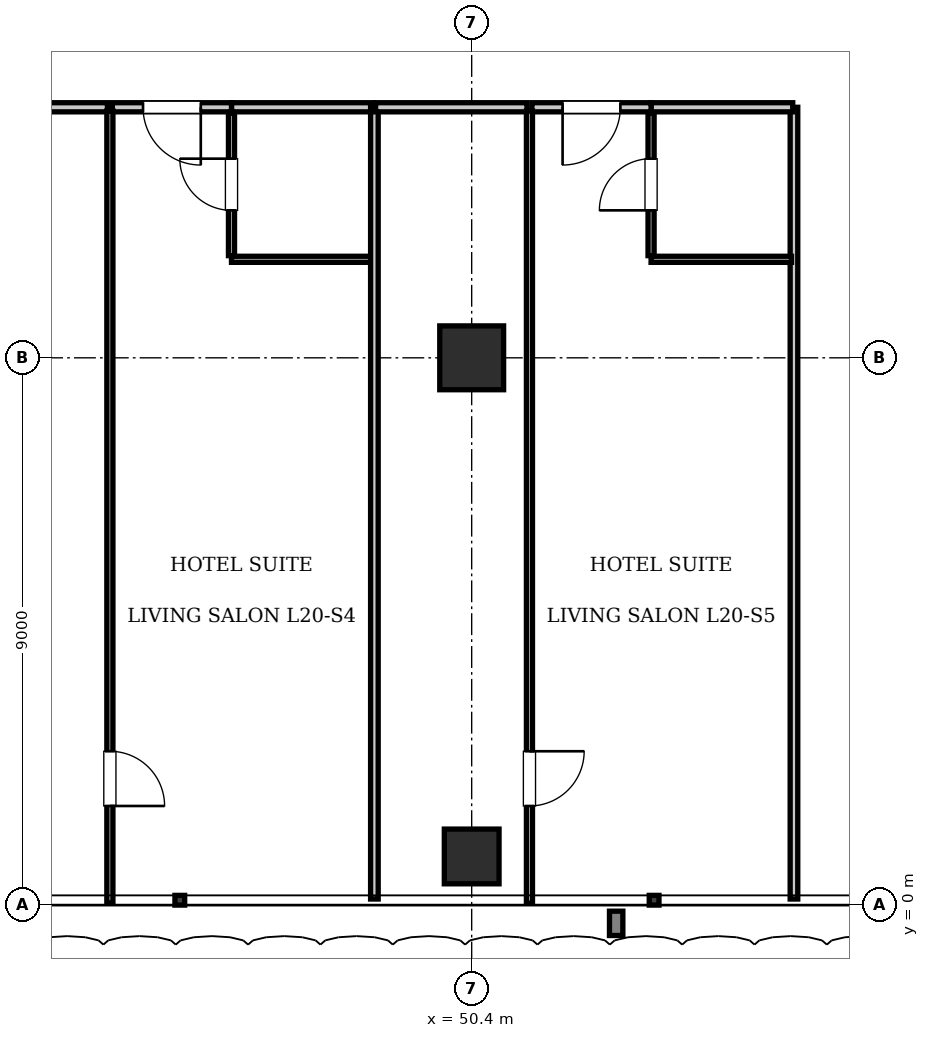
"""IFC4 building model, lengths in metres.
Left out: names, types, materials, properties, quantities, classifications, styles, units other than length and angle.
Written with IfcOpenShell. Run it as: python <this file> out.ifc"""

import sys

from ifc_helpers import new_model, si_unit, direction, frame, frame_2d, origin, origin_2d, place, context, subcontext, project, spatial, rectangle, extrude, element, fill, save


model = new_model("IFC4")
c1 = context("Model", 3, precision=1e-05, world=origin(), true_north=direction((0.0, 1.0)))
c2 = subcontext(c1, "Body", "Model", "MODEL_VIEW")
j1 = project(units=[si_unit("LENGTHUNIT", "METRE"), si_unit("PLANEANGLEUNIT", "RADIAN")], contexts=[c1])
p1 = place(None, origin())
s1 = spatial("IfcSite", under=j1, at=p1, CompositionType="ELEMENT")
p2 = place(p1, origin())
s2 = spatial("IfcBuilding", under=s1, at=p2, CompositionType="ELEMENT")
p3 = place(p2, frame((0.0, 0.0, 84.7)))
s3 = spatial("IfcBuildingStorey", under=s2, at=p3, CompositionType="ELEMENT", Elevation=84.7)
p4 = place(p3, frame((50.4, 9.0, 0.0), z_axis=(0.0, 0.0, 1.0), x_axis=(1.0, 0.0, 0.0)))
e1 = element("IfcColumn", 1, at=p4, inside=s3, PredefinedType="COLUMN", context=c2, shape_type="SweptSolid", body=[
    extrude(rectangle(XDim=1.05, YDim=1.05, at=origin_2d()), origin(), (0.0, 0.0, 1.0), 3.85),
])
p5 = place(p3, frame((50.4, 0.8, 0.0), z_axis=(0.0, 0.0, 1.0), x_axis=(1.0, 0.0, 0.0)))
e2 = element("IfcColumn", 2, at=p5, inside=s3, PredefinedType="COLUMN", context=c2, shape_type="SweptSolid", body=[
    extrude(rectangle(XDim=0.9, YDim=0.9, at=origin_2d()), origin(), (0.0, 0.0, 1.0), 3.85),
])
p6 = place(p3, frame((55.7, 0.1, 0.0), z_axis=(0.0, 0.0, 1.0), x_axis=(0.0, 1.0, 0.0)))
e3 = element("IfcWall", 3, at=p6, inside=s3, PredefinedType="PARTITIONING", context=c2, shape_type="SweptSolid", body=[
    extrude(rectangle(XDim=13.02, YDim=0.125, at=frame_2d((6.51, 0.0))), origin(), (0.0, 0.0, 1.0), 3.61),
])
p7 = place(p3, frame((46.45, 13.12, 0.0), z_axis=(0.0, 0.0, 1.0), x_axis=(1.0, 0.0, 0.0)))
e4 = element("IfcWall", 4, at=p7, inside=s3, PredefinedType="PARTITIONING", context=c2, shape_type="SweptSolid", body=[
    extrude(rectangle(XDim=2.33, YDim=0.15, at=frame_2d((1.165, 0.0))), origin(), (0.0, 0.0, 1.0), 3.61),
])
p8 = place(p3, frame((46.45, 10.62, 0.0), z_axis=(0.0, 0.0, 1.0), x_axis=(1.0, 0.0, 0.0)))
e5 = element("IfcWall", 5, at=p8, inside=s3, PredefinedType="PARTITIONING", context=c2, shape_type="SweptSolid", body=[
    extrude(rectangle(XDim=2.31, YDim=0.1, at=frame_2d((1.155, 0.0))), origin(), (0.0, 0.0, 1.0), 3.61),
])
p9 = place(p3, frame((46.45, 10.68, 0.0), z_axis=(0.0, 0.0, 1.0), x_axis=(0.0, 1.0, 0.0)))
e6 = element("IfcWall", 6, at=p9, inside=s3, PredefinedType="PARTITIONING", context=c2, shape_type="SweptSolid", body=[
    extrude(rectangle(XDim=2.34, YDim=0.1, at=frame_2d((1.17, 0.0))), origin(), (0.0, 0.0, 1.0), 3.61),
])
p10 = place(p9, frame((0.745, 0.0, 0.0)))
e7 = element("IfcOpeningElement", 7, at=p10, cuts=e6, PredefinedType="OPENING", context=c2, shape_type="SweptSolid", body=[
    extrude(rectangle(XDim=0.85, YDim=2.1, at=frame_2d((0.425, 1.05))), frame((0.0, 0.06, 0.0), z_axis=(0.0, -1.0, 0.0), x_axis=(1.0, 0.0, 0.0)), (0.0, 0.0, 1.0), 0.12),
])
p11 = place(p3, frame((41.62, 13.12, 0.0), z_axis=(0.0, 0.0, 1.0), x_axis=(1.0, 0.0, 0.0)))
e8 = element("IfcWall", 8, at=p11, inside=s3, PredefinedType="PARTITIONING", context=c2, shape_type="SweptSolid", body=[
    extrude(rectangle(XDim=2.79, YDim=0.15, at=frame_2d((1.395, 0.0))), origin(), (0.0, 0.0, 1.0), 3.61),
])
p12 = place(p3, frame((44.49, 13.12, 0.0), z_axis=(0.0, 0.0, 1.0), x_axis=(1.0, 0.0, 0.0)))
e9 = element("IfcWall", 9, at=p12, inside=s3, PredefinedType="PARTITIONING", context=c2, shape_type="SweptSolid", body=[
    extrude(rectangle(XDim=1.96, YDim=0.15, at=frame_2d((0.98, 0.0))), origin(), (0.0, 0.0, 1.0), 3.61),
])
p13 = place(p12, frame((0.505, 0.0, 0.0)))
e10 = element("IfcOpeningElement", 10, at=p13, cuts=e9, PredefinedType="OPENING", context=c2, shape_type="SweptSolid", body=[
    extrude(rectangle(XDim=0.95, YDim=2.15, at=frame_2d((0.475, 1.075))), frame((0.0, 0.085, 0.0), z_axis=(0.0, -1.0, 0.0), x_axis=(1.0, 0.0, 0.0)), (0.0, 0.0, 1.0), 0.17),
])
p14 = place(p3, frame((44.45, 0.03, 0.0), z_axis=(0.0, 0.0, 1.0), x_axis=(0.0, 1.0, 0.0)))
e11 = element("IfcWall", 11, at=p14, inside=s3, PredefinedType="PARTITIONING", context=c2, shape_type="SweptSolid", body=[
    extrude(rectangle(XDim=13.03, YDim=0.1, at=frame_2d((6.515, 0.0))), origin(), (0.0, 0.0, 1.0), 3.61),
])
p15 = place(p14, frame((1.6, 0.0, 0.0)))
e12 = element("IfcOpeningElement", 12, at=p15, cuts=e11, PredefinedType="OPENING", context=c2, shape_type="SweptSolid", body=[
    extrude(rectangle(XDim=0.9, YDim=2.1, at=frame_2d((0.45, 1.05))), frame((0.0, 0.06, 0.0), z_axis=(0.0, -1.0, 0.0), x_axis=(1.0, 0.0, 0.0)), (0.0, 0.0, 1.0), 0.12),
])
p16 = place(p3, frame((48.8, 0.1, 0.0), z_axis=(0.0, 0.0, 1.0), x_axis=(0.0, 1.0, 0.0)))
e13 = element("IfcWall", 13, at=p16, inside=s3, PredefinedType="PARTITIONING", context=c2, shape_type="SweptSolid", body=[
    extrude(rectangle(XDim=13.02, YDim=0.125, at=frame_2d((6.51, 0.0))), origin(), (0.0, 0.0, 1.0), 3.61),
])
p17 = place(p3, frame((53.35, 13.12, 0.0), z_axis=(0.0, 0.0, 1.0), x_axis=(1.0, 0.0, 0.0)))
e14 = element("IfcWall", 14, at=p17, inside=s3, PredefinedType="PARTITIONING", context=c2, shape_type="SweptSolid", body=[
    extrude(rectangle(XDim=2.33, YDim=0.15, at=frame_2d((1.165, 0.0))), origin(), (0.0, 0.0, 1.0), 3.61),
])
p18 = place(p3, frame((53.35, 10.62, 0.0), z_axis=(0.0, 0.0, 1.0), x_axis=(1.0, 0.0, 0.0)))
e15 = element("IfcWall", 15, at=p18, inside=s3, PredefinedType="PARTITIONING", context=c2, shape_type="SweptSolid", body=[
    extrude(rectangle(XDim=2.31, YDim=0.1, at=frame_2d((1.155, 0.0))), origin(), (0.0, 0.0, 1.0), 3.61),
])
p19 = place(p3, frame((53.35, 10.68, 0.0), z_axis=(0.0, 0.0, 1.0), x_axis=(0.0, 1.0, 0.0)))
e16 = element("IfcWall", 16, at=p19, inside=s3, PredefinedType="PARTITIONING", context=c2, shape_type="SweptSolid", body=[
    extrude(rectangle(XDim=2.34, YDim=0.1, at=frame_2d((1.17, 0.0))), origin(), (0.0, 0.0, 1.0), 3.61),
])
p20 = place(p19, frame((0.745, 0.0, 0.0)))
e17 = element("IfcOpeningElement", 17, at=p20, cuts=e16, PredefinedType="OPENING", context=c2, shape_type="SweptSolid", body=[
    extrude(rectangle(XDim=0.85, YDim=2.1, at=frame_2d((0.425, 1.05))), frame((0.0, 0.06, 0.0), z_axis=(0.0, -1.0, 0.0), x_axis=(1.0, 0.0, 0.0)), (0.0, 0.0, 1.0), 0.12),
])
p21 = place(p3, frame((48.82, 13.12, 0.0), z_axis=(0.0, 0.0, 1.0), x_axis=(1.0, 0.0, 0.0)))
e18 = element("IfcWall", 18, at=p21, inside=s3, PredefinedType="PARTITIONING", context=c2, shape_type="SweptSolid", body=[
    extrude(rectangle(XDim=2.49, YDim=0.15, at=frame_2d((1.245, 0.0))), origin(), (0.0, 0.0, 1.0), 3.61),
])
p22 = place(p3, frame((51.39, 13.12, 0.0), z_axis=(0.0, 0.0, 1.0), x_axis=(1.0, 0.0, 0.0)))
e19 = element("IfcWall", 19, at=p22, inside=s3, PredefinedType="PARTITIONING", context=c2, shape_type="SweptSolid", body=[
    extrude(rectangle(XDim=1.96, YDim=0.15, at=frame_2d((0.98, 0.0))), origin(), (0.0, 0.0, 1.0), 3.61),
])
p23 = place(p22, frame((0.505, 0.0, 0.0)))
e20 = element("IfcOpeningElement", 20, at=p23, cuts=e19, PredefinedType="OPENING", context=c2, shape_type="SweptSolid", body=[
    extrude(rectangle(XDim=0.95, YDim=2.15, at=frame_2d((0.475, 1.075))), frame((0.0, 0.085, 0.0), z_axis=(0.0, -1.0, 0.0), x_axis=(1.0, 0.0, 0.0)), (0.0, 0.0, 1.0), 0.17),
])
p24 = place(p3, frame((51.35, 0.03, 0.0), z_axis=(0.0, 0.0, 1.0), x_axis=(0.0, 1.0, 0.0)))
e21 = element("IfcWall", 21, at=p24, inside=s3, PredefinedType="PARTITIONING", context=c2, shape_type="SweptSolid", body=[
    extrude(rectangle(XDim=13.03, YDim=0.1, at=frame_2d((6.515, 0.0))), origin(), (0.0, 0.0, 1.0), 3.61),
])
p25 = place(p24, frame((1.6, 0.0, 0.0)))
e22 = element("IfcOpeningElement", 22, at=p25, cuts=e21, PredefinedType="OPENING", context=c2, shape_type="SweptSolid", body=[
    extrude(rectangle(XDim=0.9, YDim=2.1, at=frame_2d((0.45, 1.05))), frame((0.0, 0.06, 0.0), z_axis=(0.0, -1.0, 0.0), x_axis=(1.0, 0.0, 0.0)), (0.0, 0.0, 1.0), 0.12),
])
p26 = place(p10, origin())
e23 = element("IfcDoor", 23, at=p26, inside=s3, OperationType="SINGLE_SWING_RIGHT", PredefinedType="DOOR", context=c2, shape_type="SweptSolid", body=[
    extrude(rectangle(XDim=0.85, YDim=2.1, at=frame_2d((0.425, 1.05))), frame((0.0, 0.025, 0.0), z_axis=(0.0, -1.0, 0.0), x_axis=(1.0, 0.0, 0.0)), (0.0, 0.0, 1.0), 0.05),
])
fill(e7, e23)
p27 = place(p13, frame((0.95, 0.0, 0.0), z_axis=(0.0, 0.0, 1.0), x_axis=(-1.0, 0.0, 0.0)))
e24 = element("IfcDoor", 24, at=p27, inside=s3, OperationType="SINGLE_SWING_LEFT", PredefinedType="DOOR", context=c2, shape_type="SweptSolid", body=[
    extrude(rectangle(XDim=0.95, YDim=2.15, at=frame_2d((0.475, 1.075))), frame((0.0, 0.025, 0.0), z_axis=(0.0, -1.0, 0.0), x_axis=(1.0, 0.0, 0.0)), (0.0, 0.0, 1.0), 0.05),
])
fill(e10, e24)
p28 = place(p15, frame((0.9, 0.0, 0.0), z_axis=(0.0, 0.0, 1.0), x_axis=(-1.0, 0.0, 0.0)))
e25 = element("IfcDoor", 25, at=p28, inside=s3, OperationType="SINGLE_SWING_RIGHT", PredefinedType="DOOR", context=c2, shape_type="SweptSolid", body=[
    extrude(rectangle(XDim=0.9, YDim=2.1, at=frame_2d((0.45, 1.05))), frame((0.0, 0.025, 0.0), z_axis=(0.0, -1.0, 0.0), x_axis=(1.0, 0.0, 0.0)), (0.0, 0.0, 1.0), 0.05),
])
fill(e12, e25)
p29 = place(p20, origin())
e26 = element("IfcDoor", 26, at=p29, inside=s3, OperationType="SINGLE_SWING_LEFT", PredefinedType="DOOR", context=c2, shape_type="SweptSolid", body=[
    extrude(rectangle(XDim=0.85, YDim=2.1, at=frame_2d((0.425, 1.05))), frame((0.0, 0.025, 0.0), z_axis=(0.0, -1.0, 0.0), x_axis=(1.0, 0.0, 0.0)), (0.0, 0.0, 1.0), 0.05),
])
fill(e17, e26)
p30 = place(p23, frame((0.95, 0.0, 0.0), z_axis=(0.0, 0.0, 1.0), x_axis=(-1.0, 0.0, 0.0)))
e27 = element("IfcDoor", 27, at=p30, inside=s3, OperationType="SINGLE_SWING_RIGHT", PredefinedType="DOOR", context=c2, shape_type="SweptSolid", body=[
    extrude(rectangle(XDim=0.95, YDim=2.15, at=frame_2d((0.475, 1.075))), frame((0.0, 0.025, 0.0), z_axis=(0.0, -1.0, 0.0), x_axis=(1.0, 0.0, 0.0)), (0.0, 0.0, 1.0), 0.05),
])
fill(e20, e27)
p31 = place(p25, frame((0.9, 0.0, 0.0), z_axis=(0.0, 0.0, 1.0), x_axis=(-1.0, 0.0, 0.0)))
e28 = element("IfcDoor", 28, at=p31, inside=s3, OperationType="SINGLE_SWING_LEFT", PredefinedType="DOOR", context=c2, shape_type="SweptSolid", body=[
    extrude(rectangle(XDim=0.9, YDim=2.1, at=frame_2d((0.45, 1.05))), frame((0.0, 0.025, 0.0), z_axis=(0.0, -1.0, 0.0), x_axis=(1.0, 0.0, 0.0)), (0.0, 0.0, 1.0), 0.05),
])
fill(e22, e28)
save(model, sys.argv[1])
